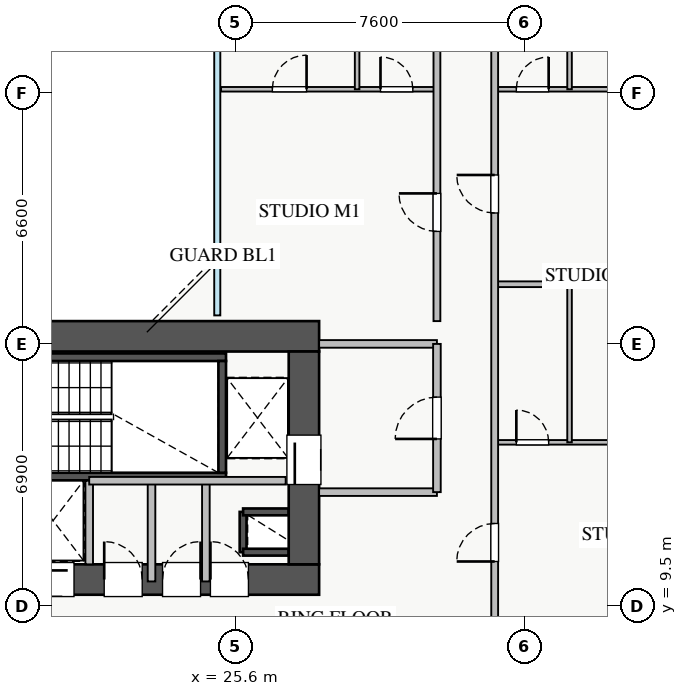
"""IFC4 building model, lengths in metres.
Left out: names, types, materials, properties, quantities, classifications, styles, units other than length and angle.
Written with IfcOpenShell. Run it as: python <this file> out.ifc"""

import sys

from ifc_helpers import new_model, si_unit, direction, frame, frame_2d, origin, place, context, subcontext, project, spatial, rectangle, extrude, source, transform, mapped, element, fill, save


model = new_model("IFC4")
c1 = context("Model", 3, precision=1e-05, world=origin(), true_north=direction((0.0, 1.0)))
c2 = subcontext(c1, "Body", "Model", "MODEL_VIEW")
j1 = project(units=[si_unit("LENGTHUNIT", "METRE"), si_unit("PLANEANGLEUNIT", "RADIAN")], contexts=[c1])
p1 = place(None, origin())
s1 = spatial("IfcSite", under=j1, at=p1, CompositionType="ELEMENT")
p2 = place(p1, origin())
s2 = spatial("IfcBuilding", under=s1, at=p2, CompositionType="ELEMENT")
p3 = place(p2, frame((0.0, 0.0, 36.0)))
s3 = spatial("IfcBuildingStorey", under=s2, at=p3, CompositionType="ELEMENT", Elevation=36.0)
p4 = place(p3, frame((25.8, 10.92, 0.0), z_axis=(0.0, 0.0, 1.0), x_axis=(0.0, 1.0, 0.0)))
e1 = element("IfcWall", 1, at=p4, inside=s3, PredefinedType="SHEAR", context=c2, shape_type="SweptSolid", body=[
    extrude(rectangle(XDim=1.06, YDim=0.18, at=frame_2d((0.53, 0.0))), origin(), (0.0, 0.0, 1.0), 3.07),
])
for number, where, z_axis, x_axis in (
    (2, (25.8, 11.98, 0.0), (0.0, 0.0, 1.0), (1.0, 0.0, 0.0)),
    (3, (25.8, 10.92, 0.0), (0.0, 0.0, 1.0), (1.0, 0.0, 0.0)),
):
    element("IfcWall", number, at=place(p3, frame(where, z_axis=z_axis, x_axis=x_axis)), inside=s3, PredefinedType="SHEAR", context=c2, shape_type="SweptSolid", body=[
        extrude(rectangle(XDim=1.2, YDim=0.18, at=frame_2d((0.6, 0.0))), origin(), (0.0, 0.0, 1.0), 3.07),
    ])
p5 = place(p3, frame((19.88, 12.8, 0.0), z_axis=(0.0, 0.0, 1.0), x_axis=(1.0, 0.0, 0.0)))
e4 = element("IfcWall", 4, at=p5, inside=s3, PredefinedType="SHEAR", context=c2, shape_type="SweptSolid", body=[
    extrude(rectangle(XDim=1.87, YDim=0.18, at=frame_2d((0.935, 0.0))), origin(), (0.0, 0.0, 1.0), 3.07),
])
p6 = place(p3, frame((18.2, 12.91, 0.0), z_axis=(0.0, 0.0, 1.0), x_axis=(1.0, 0.0, 0.0)))
e5 = element("IfcWall", 5, at=p6, inside=s3, PredefinedType="SHEAR", context=c2, shape_type="SweptSolid", body=[
    extrude(rectangle(XDim=7.15, YDim=0.2, at=frame_2d((3.575, 0.0))), origin(), (0.0, 0.0, 1.0), 3.25),
])
p7 = place(p6, frame((0.35, 0.0, 0.0)))
e6 = element("IfcOpeningElement", 6, at=p7, cuts=e5, PredefinedType="OPENING", context=c2, shape_type="SweptSolid", body=[
    extrude(rectangle(XDim=1.1, YDim=2.05, at=frame_2d((0.55, 1.025))), frame((0.0, 0.11, 0.0), z_axis=(0.0, -1.0, 0.0), x_axis=(1.0, 0.0, 0.0)), (0.0, 0.0, 1.0), 0.22),
])
p8 = place(p3, frame((18.2, 16.05, 0.0), z_axis=(0.0, 0.0, 1.0), x_axis=(1.0, 0.0, 0.0)))
e7 = element("IfcWall", 7, at=p8, inside=s3, PredefinedType="SHEAR", context=c2, shape_type="SweptSolid", body=[
    extrude(rectangle(XDim=7.15, YDim=0.2, at=frame_2d((3.575, 0.0))), origin(), (0.0, 0.0, 1.0), 3.25),
])
p9 = place(p3, frame((25.25, 13.01, 0.0), z_axis=(0.0, 0.0, 1.0), x_axis=(0.0, 1.0, 0.0)))
e8 = element("IfcWall", 8, at=p9, inside=s3, PredefinedType="SHEAR", context=c2, shape_type="SweptSolid", body=[
    extrude(rectangle(XDim=2.94, YDim=0.2, at=frame_2d((1.47, 0.0))), origin(), (0.0, 0.0, 1.0), 3.25),
])
p10 = place(p3, frame((10.2, 10.2, 0.0), z_axis=(0.0, 0.0, 1.0), x_axis=(1.0, 0.0, 0.0)))
e9 = element("IfcWall", 9, at=p10, inside=s3, PredefinedType="SHEAR", context=c2, shape_type="SweptSolid", body=[
    extrude(rectangle(XDim=17.6, YDim=0.8, at=frame_2d((8.8, 0.0))), origin(), (0.0, 0.0, 1.0), 3.25),
])
p11 = place(p10, frame((1.15, 0.0, 0.0)))
e10 = element("IfcOpeningElement", 10, at=p11, cuts=e9, PredefinedType="OPENING", context=c2, shape_type="SweptSolid", body=[
    extrude(rectangle(XDim=1.1, YDim=2.05, at=frame_2d((0.55, 1.025))), frame((0.0, 0.41, 0.0), z_axis=(0.0, -1.0, 0.0), x_axis=(1.0, 0.0, 0.0)), (0.0, 0.0, 1.0), 0.82),
])
p12 = place(p10, frame((8.3, 0.0, 0.0)))
e11 = element("IfcOpeningElement", 11, at=p12, cuts=e9, PredefinedType="OPENING", context=c2, shape_type="SweptSolid", body=[
    extrude(rectangle(XDim=1.1, YDim=2.05, at=frame_2d((0.55, 1.025))), frame((0.0, 0.41, 0.0), z_axis=(0.0, -1.0, 0.0), x_axis=(1.0, 0.0, 0.0)), (0.0, 0.0, 1.0), 0.82),
])
p13 = place(p10, frame((10.05, 0.0, 0.0)))
e12 = element("IfcOpeningElement", 12, at=p13, cuts=e9, PredefinedType="OPENING", context=c2, shape_type="SweptSolid", body=[
    extrude(rectangle(XDim=1.1, YDim=2.05, at=frame_2d((0.55, 1.025))), frame((0.0, 0.41, 0.0), z_axis=(0.0, -1.0, 0.0), x_axis=(1.0, 0.0, 0.0)), (0.0, 0.0, 1.0), 0.82),
])
p14 = place(p10, frame((14.74, 0.0, 0.0)))
e13 = element("IfcOpeningElement", 13, at=p14, cuts=e9, PredefinedType="OPENING", context=c2, shape_type="SweptSolid", body=[
    extrude(rectangle(XDim=1.0, YDim=2.05, at=frame_2d((0.5, 1.025))), frame((0.0, 0.41, 0.0), z_axis=(0.0, -1.0, 0.0), x_axis=(1.0, 0.0, 0.0)), (0.0, 0.0, 1.0), 0.82),
])
p15 = place(p10, frame((11.945, 0.0, 0.0)))
e14 = element("IfcOpeningElement", 14, at=p15, cuts=e9, PredefinedType="OPENING", context=c2, shape_type="SweptSolid", body=[
    extrude(rectangle(XDim=1.0, YDim=2.05, at=frame_2d((0.5, 1.025))), frame((0.0, 0.41, 0.0), z_axis=(0.0, -1.0, 0.0), x_axis=(1.0, 0.0, 0.0)), (0.0, 0.0, 1.0), 0.82),
])
p16 = place(p10, frame((13.48, 0.0, 0.0)))
e15 = element("IfcOpeningElement", 15, at=p16, cuts=e9, PredefinedType="OPENING", context=c2, shape_type="SweptSolid", body=[
    extrude(rectangle(XDim=1.0, YDim=2.05, at=frame_2d((0.5, 1.025))), frame((0.0, 0.41, 0.0), z_axis=(0.0, -1.0, 0.0), x_axis=(1.0, 0.0, 0.0)), (0.0, 0.0, 1.0), 0.82),
])
p17 = place(p3, frame((10.2, 16.6, 0.0), z_axis=(0.0, 0.0, 1.0), x_axis=(1.0, 0.0, 0.0)))
e16 = element("IfcWall", 16, at=p17, inside=s3, PredefinedType="SHEAR", context=c2, shape_type="SweptSolid", body=[
    extrude(rectangle(XDim=17.6, YDim=0.8, at=frame_2d((8.8, 0.0))), origin(), (0.0, 0.0, 1.0), 3.25),
])
p18 = place(p3, frame((27.4, 10.6, 0.0), z_axis=(0.0, 0.0, 1.0), x_axis=(0.0, 1.0, 0.0)))
e17 = element("IfcWall", 17, at=p18, inside=s3, PredefinedType="SHEAR", context=c2, shape_type="SweptSolid", body=[
    extrude(rectangle(XDim=5.6, YDim=0.8, at=frame_2d((2.8, 0.0))), origin(), (0.0, 0.0, 1.0), 3.25),
])
p19 = place(p18, frame((2.1, 0.0, 0.0)))
e18 = element("IfcOpeningElement", 18, at=p19, cuts=e17, PredefinedType="OPENING", context=c2, shape_type="SweptSolid", body=[
    extrude(rectangle(XDim=1.3, YDim=2.05, at=frame_2d((0.65, 1.025))), frame((0.0, 0.41, 0.0), z_axis=(0.0, -1.0, 0.0), x_axis=(1.0, 0.0, 0.0)), (0.0, 0.0, 1.0), 0.82),
])
for number, where, z_axis, x_axis in (
    (19, (27.8, 16.4, 0.0), (0.0, 0.0, 1.0), (1.0, 0.0, 0.0)),
    (20, (27.8, 12.5, 0.0), (0.0, 0.0, 1.0), (1.0, 0.0, 0.0)),
):
    element("IfcWall", number, at=place(p3, frame(where, z_axis=z_axis, x_axis=x_axis)), inside=s3, PredefinedType="PARTITIONING", context=c2, shape_type="SweptSolid", body=[
        extrude(rectangle(XDim=3.1, YDim=0.2, at=frame_2d((1.55, 0.0))), origin(), (0.0, 0.0, 1.0), 3.07),
    ])
p20 = place(p3, frame((30.9, 12.5, 0.0), z_axis=(0.0, 0.0, 1.0), x_axis=(0.0, 1.0, 0.0)))
e21 = element("IfcWall", 21, at=p20, inside=s3, PredefinedType="PARTITIONING", context=c2, shape_type="SweptSolid", body=[
    extrude(rectangle(XDim=3.9, YDim=0.2, at=frame_2d((1.95, 0.0))), origin(), (0.0, 0.0, 1.0), 3.07),
])
p21 = place(p20, frame((1.4, 0.0, 0.0)))
e22 = element("IfcOpeningElement", 22, at=p21, cuts=e21, PredefinedType="OPENING", context=c2, shape_type="SweptSolid", body=[
    extrude(rectangle(XDim=1.1, YDim=2.05, at=frame_2d((0.55, 1.025))), frame((0.0, 0.11, 0.0), z_axis=(0.0, -1.0, 0.0), x_axis=(1.0, 0.0, 0.0)), (0.0, 0.0, 1.0), 0.22),
])
p22 = place(p3, frame((24.82, 10.15, 0.0), z_axis=(0.0, 0.0, 1.0), x_axis=(0.0, 1.0, 0.0)))
e23 = element("IfcWall", 23, at=p22, inside=s3, PredefinedType="PARTITIONING", context=c2, shape_type="SweptSolid", body=[
    extrude(rectangle(XDim=2.65, YDim=0.2, at=frame_2d((1.325, 0.0))), origin(), (0.0, 0.0, 1.0), 3.07),
])
p23 = place(p3, frame((21.75, 10.6, 0.0), z_axis=(0.0, 0.0, 1.0), x_axis=(0.0, 1.0, 0.0)))
e24 = element("IfcWall", 24, at=p23, inside=s3, PredefinedType="PARTITIONING", context=c2, shape_type="SweptSolid", body=[
    extrude(rectangle(XDim=2.2, YDim=0.2, at=frame_2d((1.1, 0.0))), origin(), (0.0, 0.0, 1.0), 3.07),
])
p24 = place(p3, frame((23.39, 10.15, 0.0), z_axis=(0.0, 0.0, 1.0), x_axis=(0.0, 1.0, 0.0)))
e25 = element("IfcWall", 25, at=p24, inside=s3, PredefinedType="PARTITIONING", context=c2, shape_type="SweptSolid", body=[
    extrude(rectangle(XDim=2.65, YDim=0.2, at=frame_2d((1.325, 0.0))), origin(), (0.0, 0.0, 1.0), 3.07),
])
p25 = place(p3, frame((21.75, 12.8, 0.0), z_axis=(0.0, 0.0, 1.0), x_axis=(1.0, 0.0, 0.0)))
e26 = element("IfcWall", 26, at=p25, inside=s3, PredefinedType="PARTITIONING", context=c2, shape_type="SweptSolid", body=[
    extrude(rectangle(XDim=5.17, YDim=0.2, at=frame_2d((2.585, 0.0))), origin(), (0.0, 0.0, 1.0), 3.07),
])
p26 = place(p3, frame((32.42, 13.81, 0.0), z_axis=(0.0, 0.0, 1.0), x_axis=(1.0, 0.0, 0.0)))
e27 = element("IfcWall", 27, at=p26, inside=s3, PredefinedType="PLUMBINGWALL", context=c2, shape_type="SweptSolid", body=[
    extrude(rectangle(XDim=5.33, YDim=0.12, at=frame_2d((2.665, 0.0))), origin(), (0.0, 0.0, 1.0), 3.07),
])
p27 = place(p26, frame((0.57, 0.0, 0.0)))
e28 = element("IfcOpeningElement", 28, at=p27, cuts=e27, PredefinedType="OPENING", context=c2, shape_type="SweptSolid", body=[
    extrude(rectangle(XDim=0.85, YDim=2.05, at=frame_2d((0.425, 1.025))), frame((0.0, 0.07, 0.0), z_axis=(0.0, -1.0, 0.0), x_axis=(1.0, 0.0, 0.0)), (0.0, 0.0, 1.0), 0.14),
])
p28 = place(p26, frame((3.19, 0.0, 0.0)))
e29 = element("IfcOpeningElement", 29, at=p28, cuts=e27, PredefinedType="OPENING", context=c2, shape_type="SweptSolid", body=[
    extrude(rectangle(XDim=0.9, YDim=2.05, at=frame_2d((0.45, 1.025))), frame((0.0, 0.07, 0.0), z_axis=(0.0, -1.0, 0.0), x_axis=(1.0, 0.0, 0.0)), (0.0, 0.0, 1.0), 0.14),
])
p29 = place(p3, frame((34.39, 13.81, 0.0), z_axis=(0.0, 0.0, 1.0), x_axis=(0.0, 1.0, 0.0)))
e30 = element("IfcWall", 30, at=p29, inside=s3, PredefinedType="PLUMBINGWALL", context=c2, shape_type="SweptSolid", body=[
    extrude(rectangle(XDim=4.16, YDim=0.12, at=frame_2d((2.08, 0.0))), origin(), (0.0, 0.0, 1.0), 3.07),
])
p30 = place(p3, frame((32.42, 23.1, 0.0), z_axis=(0.0, 0.0, 1.0), x_axis=(1.0, 0.0, 0.0)))
e31 = element("IfcWall", 31, at=p30, inside=s3, PredefinedType="PLUMBINGWALL", context=c2, shape_type="SweptSolid", body=[
    extrude(rectangle(XDim=5.33, YDim=0.12, at=frame_2d((2.665, 0.0))), origin(), (0.0, 0.0, 1.0), 3.07),
])
p31 = place(p30, frame((0.57, 0.0, 0.0)))
e32 = element("IfcOpeningElement", 32, at=p31, cuts=e31, PredefinedType="OPENING", context=c2, shape_type="SweptSolid", body=[
    extrude(rectangle(XDim=0.85, YDim=2.05, at=frame_2d((0.425, 1.025))), frame((0.0, 0.07, 0.0), z_axis=(0.0, -1.0, 0.0), x_axis=(1.0, 0.0, 0.0)), (0.0, 0.0, 1.0), 0.14),
])
p32 = place(p30, frame((3.19, 0.0, 0.0)))
e33 = element("IfcOpeningElement", 33, at=p32, cuts=e31, PredefinedType="OPENING", context=c2, shape_type="SweptSolid", body=[
    extrude(rectangle(XDim=0.9, YDim=2.05, at=frame_2d((0.45, 1.025))), frame((0.0, 0.07, 0.0), z_axis=(0.0, -1.0, 0.0), x_axis=(1.0, 0.0, 0.0)), (0.0, 0.0, 1.0), 0.14),
])
p33 = place(p3, frame((34.39, 23.1, 0.0), z_axis=(0.0, 0.0, 1.0), x_axis=(0.0, 1.0, 0.0)))
e34 = element("IfcWall", 34, at=p33, inside=s3, PredefinedType="PLUMBINGWALL", context=c2, shape_type="SweptSolid", body=[
    extrude(rectangle(XDim=4.83, YDim=0.12, at=frame_2d((2.415, 0.0))), origin(), (0.0, 0.0, 1.0), 3.07),
])
p34 = place(p3, frame((32.42, 17.97, 0.0), z_axis=(0.0, 0.0, 1.0), x_axis=(1.0, 0.0, 0.0)))
e35 = element("IfcWall", 35, at=p34, inside=s3, PredefinedType="PARTITIONING", context=c2, shape_type="SweptSolid", body=[
    extrude(rectangle(XDim=5.33, YDim=0.15, at=frame_2d((2.665, 0.0))), origin(), (0.0, 0.0, 1.0), 3.07),
])
p35 = place(p3, frame((32.42, 7.21, 0.0), z_axis=(0.0, 0.0, 1.0), x_axis=(0.0, 1.0, 0.0)))
e36 = element("IfcWall", 36, at=p35, inside=s3, PredefinedType="PARTITIONING", context=c2, shape_type="SweptSolid", body=[
    extrude(rectangle(XDim=31.23, YDim=0.18, at=frame_2d((15.615, 0.0))), origin(), (0.0, 0.0, 1.0), 2.815),
])
p36 = place(p35, frame((30.09, 0.0, 0.0)))
e37 = element("IfcOpeningElement", 37, at=p36, cuts=e36, PredefinedType="OPENING", context=c2, shape_type="SweptSolid", body=[
    extrude(rectangle(XDim=0.9, YDim=2.05, at=frame_2d((0.45, 1.025))), frame((0.0, 0.1, 0.0), z_axis=(0.0, -1.0, 0.0), x_axis=(1.0, 0.0, 0.0)), (0.0, 0.0, 1.0), 0.2),
])
p37 = place(p35, frame((0.415, 0.0, 0.0)))
e38 = element("IfcOpeningElement", 38, at=p37, cuts=e36, PredefinedType="OPENING", context=c2, shape_type="SweptSolid", body=[
    extrude(rectangle(XDim=0.9, YDim=2.05, at=frame_2d((0.45, 1.025))), frame((0.0, 0.1, 0.0), z_axis=(0.0, -1.0, 0.0), x_axis=(1.0, 0.0, 0.0)), (0.0, 0.0, 1.0), 0.2),
])
p38 = place(p35, frame((3.465, 0.0, 0.0)))
e39 = element("IfcOpeningElement", 39, at=p38, cuts=e36, PredefinedType="OPENING", context=c2, shape_type="SweptSolid", body=[
    extrude(rectangle(XDim=1.0, YDim=2.05, at=frame_2d((0.5, 1.025))), frame((0.0, 0.1, 0.0), z_axis=(0.0, -1.0, 0.0), x_axis=(1.0, 0.0, 0.0)), (0.0, 0.0, 1.0), 0.2),
])
p39 = place(p35, frame((12.635, 0.0, 0.0)))
e40 = element("IfcOpeningElement", 40, at=p39, cuts=e36, PredefinedType="OPENING", context=c2, shape_type="SweptSolid", body=[
    extrude(rectangle(XDim=1.0, YDim=2.05, at=frame_2d((0.5, 1.025))), frame((0.0, 0.1, 0.0), z_axis=(0.0, -1.0, 0.0), x_axis=(1.0, 0.0, 0.0)), (0.0, 0.0, 1.0), 0.2),
])
p40 = place(p35, frame((22.5, 0.0, 0.0)))
e41 = element("IfcOpeningElement", 41, at=p40, cuts=e36, PredefinedType="OPENING", context=c2, shape_type="SweptSolid", body=[
    extrude(rectangle(XDim=1.0, YDim=2.05, at=frame_2d((0.5, 1.025))), frame((0.0, 0.1, 0.0), z_axis=(0.0, -1.0, 0.0), x_axis=(1.0, 0.0, 0.0)), (0.0, 0.0, 1.0), 0.2),
])
p41 = place(p3, frame((25.22, 23.1, 0.0), z_axis=(0.0, 0.0, 1.0), x_axis=(1.0, 0.0, 0.0)))
e42 = element("IfcWall", 42, at=p41, inside=s3, PredefinedType="PLUMBINGWALL", context=c2, shape_type="SweptSolid", body=[
    extrude(rectangle(XDim=5.68, YDim=0.12, at=frame_2d((2.84, 0.0))), origin(), (0.0, 0.0, 1.0), 3.07),
])
p42 = place(p41, frame((1.35, 0.0, 0.0)))
e43 = element("IfcOpeningElement", 43, at=p42, cuts=e42, PredefinedType="OPENING", context=c2, shape_type="SweptSolid", body=[
    extrude(rectangle(XDim=0.9, YDim=2.05, at=frame_2d((0.45, 1.025))), frame((0.0, 0.07, 0.0), z_axis=(0.0, -1.0, 0.0), x_axis=(1.0, 0.0, 0.0)), (0.0, 0.0, 1.0), 0.14),
])
p43 = place(p41, frame((4.195, 0.0, 0.0)))
e44 = element("IfcOpeningElement", 44, at=p43, cuts=e42, PredefinedType="OPENING", context=c2, shape_type="SweptSolid", body=[
    extrude(rectangle(XDim=0.85, YDim=2.05, at=frame_2d((0.425, 1.025))), frame((0.0, 0.07, 0.0), z_axis=(0.0, -1.0, 0.0), x_axis=(1.0, 0.0, 0.0)), (0.0, 0.0, 1.0), 0.14),
])
p44 = place(p3, frame((28.8, 23.1, 0.0), z_axis=(0.0, 0.0, 1.0), x_axis=(0.0, 1.0, 0.0)))
e45 = element("IfcWall", 45, at=p44, inside=s3, PredefinedType="PLUMBINGWALL", context=c2, shape_type="SweptSolid", body=[
    extrude(rectangle(XDim=5.9, YDim=0.12, at=frame_2d((2.95, 0.0))), origin(), (0.0, 0.0, 1.0), 3.07),
])
p45 = place(p3, frame((30.9, 17.0, 0.0), z_axis=(0.0, 0.0, 1.0), x_axis=(0.0, 1.0, 0.0)))
e46 = element("IfcWall", 46, at=p45, inside=s3, PredefinedType="PARTITIONING", context=c2, shape_type="SweptSolid", body=[
    extrude(rectangle(XDim=12.0, YDim=0.18, at=frame_2d((6.0, 0.0))), origin(), (0.0, 0.0, 1.0), 3.07),
])
p46 = place(p45, frame((2.36, 0.0, 0.0)))
e47 = element("IfcOpeningElement", 47, at=p46, cuts=e46, PredefinedType="OPENING", context=c2, shape_type="SweptSolid", body=[
    extrude(rectangle(XDim=1.0, YDim=2.05, at=frame_2d((0.5, 1.025))), frame((0.0, 0.1, 0.0), z_axis=(0.0, -1.0, 0.0), x_axis=(1.0, 0.0, 0.0)), (0.0, 0.0, 1.0), 0.2),
])
m1 = source(origin(), c2, "Body", "SweptSolid", [
    extrude(rectangle(XDim=1.3, YDim=2.05, at=frame_2d((0.65, 1.025))), frame((0.0, 0.025, 0.0), z_axis=(0.0, -1.0, 0.0), x_axis=(1.0, 0.0, 0.0)), (0.0, 0.0, 1.0), 0.05),
])
p47 = place(p19, origin())
e48 = element("IfcDoor", 48, at=p47, inside=s3, OperationType="SLIDING_TO_RIGHT", PredefinedType="DOOR", context=c2, shape_type="MappedRepresentation", body=[
    mapped(m1, transform((0.0, 0.0, 0.0), x_axis=(1.0, 0.0, 0.0), y_axis=(0.0, 1.0, 0.0), z_axis=(0.0, 0.0, 1.0), scale=1.0)),
])
fill(e18, e48)
m2 = source(origin(), c2, "Body", "SweptSolid", [
    extrude(rectangle(XDim=1.1, YDim=2.05, at=frame_2d((0.55, 1.025))), frame((0.0, 0.025, 0.0), z_axis=(0.0, -1.0, 0.0), x_axis=(1.0, 0.0, 0.0)), (0.0, 0.0, 1.0), 0.05),
])
p48 = place(p13, origin())
e49 = element("IfcDoor", 49, at=p48, inside=s3, OperationType="SLIDING_TO_RIGHT", PredefinedType="DOOR", context=c2, shape_type="MappedRepresentation", body=[
    mapped(m2, transform((0.0, 0.0, 0.0), x_axis=(1.0, 0.0, 0.0), y_axis=(0.0, 1.0, 0.0), z_axis=(0.0, 0.0, 1.0), scale=1.0)),
])
fill(e12, e49)
m3 = source(origin(), c2, "Body", "SweptSolid", [
    extrude(rectangle(XDim=1.0, YDim=2.05, at=frame_2d((0.5, 1.025))), frame((0.0, 0.025, 0.0), z_axis=(0.0, -1.0, 0.0), x_axis=(1.0, 0.0, 0.0)), (0.0, 0.0, 1.0), 0.05),
])
p49 = place(p14, origin())
e50 = element("IfcDoor", 50, at=p49, inside=s3, OperationType="SINGLE_SWING_LEFT", PredefinedType="DOOR", context=c2, shape_type="MappedRepresentation", body=[
    mapped(m3, transform((0.0, 0.0, 0.0), x_axis=(1.0, 0.0, 0.0), y_axis=(0.0, 1.0, 0.0), z_axis=(0.0, 0.0, 1.0), scale=1.0)),
])
fill(e13, e50)
p50 = place(p15, origin())
e51 = element("IfcDoor", 51, at=p50, inside=s3, OperationType="SINGLE_SWING_LEFT", PredefinedType="DOOR", context=c2, shape_type="MappedRepresentation", body=[
    mapped(m3, transform((0.0, 0.0, 0.0), x_axis=(1.0, 0.0, 0.0), y_axis=(0.0, 1.0, 0.0), z_axis=(0.0, 0.0, 1.0), scale=1.0)),
])
fill(e14, e51)
p51 = place(p16, origin())
e52 = element("IfcDoor", 52, at=p51, inside=s3, OperationType="SINGLE_SWING_RIGHT", PredefinedType="DOOR", context=c2, shape_type="MappedRepresentation", body=[
    mapped(m3, transform((0.0, 0.0, 0.0), x_axis=(1.0, 0.0, 0.0), y_axis=(0.0, 1.0, 0.0), z_axis=(0.0, 0.0, 1.0), scale=1.0)),
])
fill(e15, e52)
p52 = place(p21, origin())
e53 = element("IfcDoor", 53, at=p52, inside=s3, OperationType="SINGLE_SWING_LEFT", PredefinedType="DOOR", context=c2, shape_type="MappedRepresentation", body=[
    mapped(m2, transform((0.0, 0.0, 0.0), x_axis=(1.0, 0.0, 0.0), y_axis=(0.0, 1.0, 0.0), z_axis=(0.0, 0.0, 1.0), scale=1.0)),
])
fill(e22, e53)
m4 = source(origin(), c2, "Body", "SweptSolid", [
    extrude(rectangle(XDim=0.85, YDim=2.05, at=frame_2d((0.425, 1.025))), frame((0.0, 0.025, 0.0), z_axis=(0.0, -1.0, 0.0), x_axis=(1.0, 0.0, 0.0)), (0.0, 0.0, 1.0), 0.05),
])
p53 = place(p27, origin())
e54 = element("IfcDoor", 54, at=p53, inside=s3, OperationType="SINGLE_SWING_LEFT", PredefinedType="DOOR", context=c2, shape_type="MappedRepresentation", body=[
    mapped(m4, transform((0.0, 0.0, 0.0), x_axis=(1.0, 0.0, 0.0), y_axis=(0.0, 1.0, 0.0), z_axis=(0.0, 0.0, 1.0), scale=1.0)),
])
fill(e28, e54)
p54 = place(p31, origin())
e55 = element("IfcDoor", 55, at=p54, inside=s3, OperationType="SINGLE_SWING_RIGHT", PredefinedType="DOOR", context=c2, shape_type="MappedRepresentation", body=[
    mapped(m4, transform((0.0, 0.0, 0.0), x_axis=(1.0, 0.0, 0.0), y_axis=(0.0, 1.0, 0.0), z_axis=(0.0, 0.0, 1.0), scale=1.0)),
])
fill(e32, e55)
p55 = place(p38, origin())
e56 = element("IfcDoor", 56, at=p55, inside=s3, OperationType="SINGLE_SWING_LEFT", PredefinedType="DOOR", context=c2, shape_type="MappedRepresentation", body=[
    mapped(m3, transform((0.0, 0.0, 0.0), x_axis=(1.0, 0.0, 0.0), y_axis=(0.0, 1.0, 0.0), z_axis=(0.0, 0.0, 1.0), scale=1.0)),
])
fill(e39, e56)
p56 = place(p39, origin())
e57 = element("IfcDoor", 57, at=p56, inside=s3, OperationType="SINGLE_SWING_RIGHT", PredefinedType="DOOR", context=c2, shape_type="MappedRepresentation", body=[
    mapped(m3, transform((0.0, 0.0, 0.0), x_axis=(1.0, 0.0, 0.0), y_axis=(0.0, 1.0, 0.0), z_axis=(0.0, 0.0, 1.0), scale=1.0)),
])
fill(e40, e57)
m5 = source(origin(), c2, "Body", "SweptSolid", [
    extrude(rectangle(XDim=0.9, YDim=2.05, at=frame_2d((0.45, 1.025))), frame((0.0, 0.025, 0.0), z_axis=(0.0, -1.0, 0.0), x_axis=(1.0, 0.0, 0.0)), (0.0, 0.0, 1.0), 0.05),
])
p57 = place(p42, origin())
e58 = element("IfcDoor", 58, at=p57, inside=s3, OperationType="SINGLE_SWING_RIGHT", PredefinedType="DOOR", context=c2, shape_type="MappedRepresentation", body=[
    mapped(m5, transform((0.0, 0.0, 0.0), x_axis=(1.0, 0.0, 0.0), y_axis=(0.0, 1.0, 0.0), z_axis=(0.0, 0.0, 1.0), scale=1.0)),
])
fill(e43, e58)
p58 = place(p43, origin())
e59 = element("IfcDoor", 59, at=p58, inside=s3, OperationType="SINGLE_SWING_LEFT", PredefinedType="DOOR", context=c2, shape_type="MappedRepresentation", body=[
    mapped(m4, transform((0.0, 0.0, 0.0), x_axis=(1.0, 0.0, 0.0), y_axis=(0.0, 1.0, 0.0), z_axis=(0.0, 0.0, 1.0), scale=1.0)),
])
fill(e44, e59)
p59 = place(p46, origin())
e60 = element("IfcDoor", 60, at=p59, inside=s3, OperationType="SINGLE_SWING_RIGHT", PredefinedType="DOOR", context=c2, shape_type="MappedRepresentation", body=[
    mapped(m3, transform((0.0, 0.0, 0.0), x_axis=(1.0, 0.0, 0.0), y_axis=(0.0, 1.0, 0.0), z_axis=(0.0, 0.0, 1.0), scale=1.0)),
])
fill(e47, e60)
save(model, sys.argv[1])
